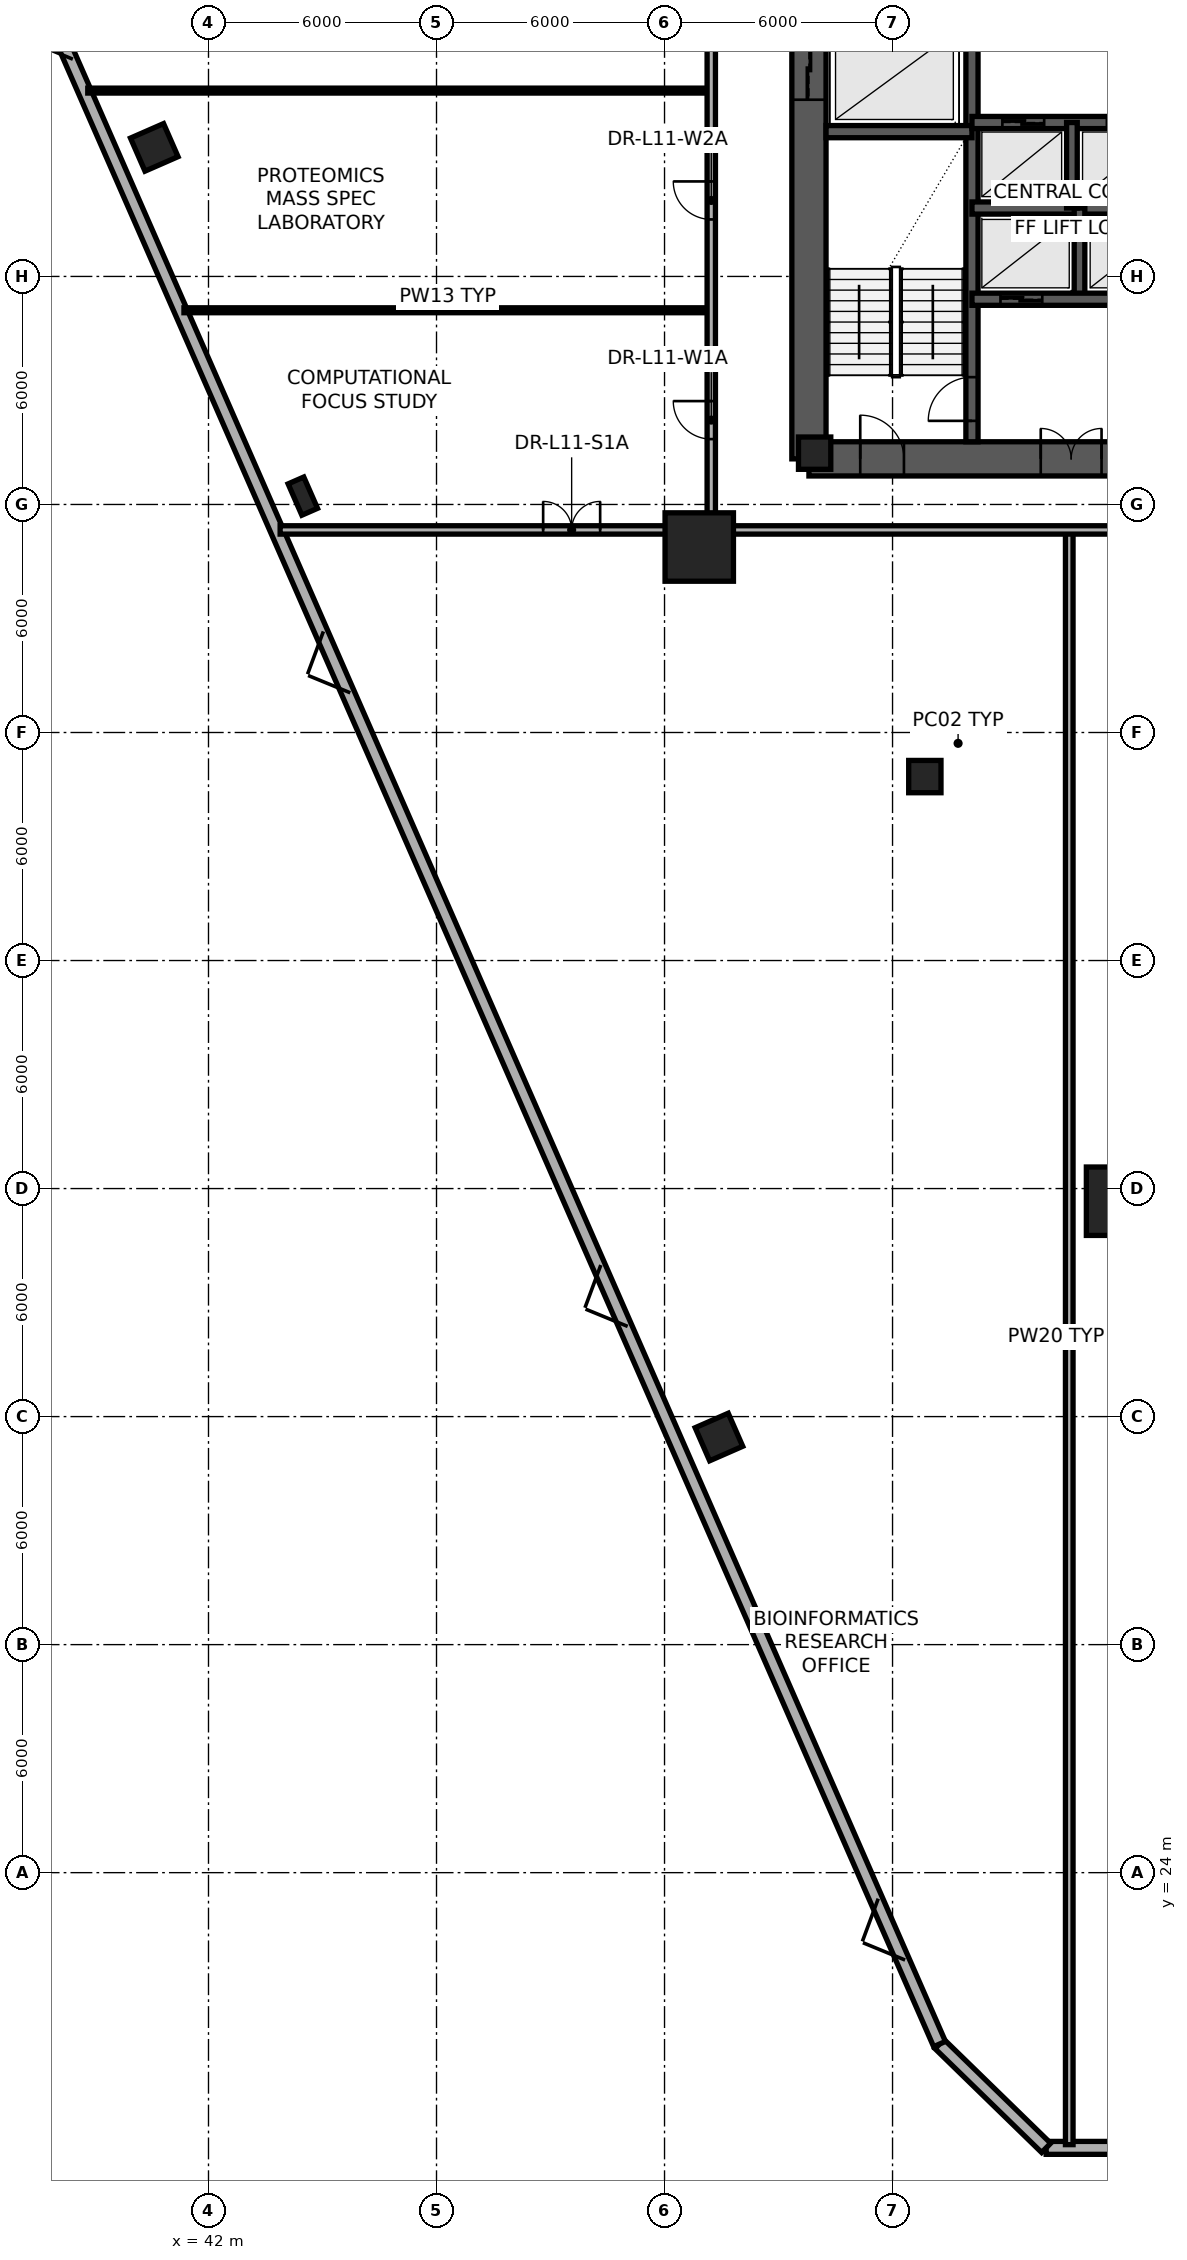
"""IFC4 building model, lengths in metres.
Left out: names, types, materials, properties, quantities, classifications, styles, units other than length and angle.
Written with IfcOpenShell. Run it as: python <this file> out.ifc"""

import sys

from ifc_helpers import new_model, si_unit, direction, frame, frame_2d, origin, origin_2d, place, context, subcontext, project, spatial, rectangle, extrude, element, fill, save


model = new_model("IFC4")
c1 = context("Model", 3, precision=1e-05, world=origin(), true_north=direction((0.0, 1.0)))
c2 = subcontext(c1, "Body", "Model", "MODEL_VIEW")
j1 = project(units=[si_unit("LENGTHUNIT", "METRE"), si_unit("PLANEANGLEUNIT", "RADIAN")], contexts=[c1])
p1 = place(None, origin())
s1 = spatial("IfcSite", under=j1, at=p1, CompositionType="ELEMENT")
p2 = place(p1, origin())
s2 = spatial("IfcBuilding", under=s1, at=p2, CompositionType="ELEMENT")
p3 = place(p2, frame((0.0, 0.0, 44.7)))
s3 = spatial("IfcBuildingStorey", under=s2, at=p3, CompositionType="ELEMENT", Elevation=44.7)
p4 = place(p3, frame((57.8, 61.2, 0.0), z_axis=(0.0, 0.0, 1.0), x_axis=(1.0, 0.0, 0.0)))
e1 = element("IfcWall", 1, at=p4, inside=s3, PredefinedType="SHEAR", context=c2, shape_type="SweptSolid", body=[
    extrude(rectangle(XDim=16.4, YDim=0.9, at=frame_2d((8.2, 0.0))), origin(), (0.0, 0.0, 1.0), 3.65),
])
p5 = place(p4, frame((1.35, 0.0, 0.0)))
e2 = element("IfcOpeningElement", 2, at=p5, cuts=e1, PredefinedType="OPENING", context=c2, shape_type="SweptSolid", body=[
    extrude(rectangle(XDim=1.15, YDim=2.15, at=frame_2d((0.575, 1.075))), frame((0.0, 0.46, 0.0), z_axis=(0.0, -1.0, 0.0), x_axis=(1.0, 0.0, 0.0)), (0.0, 0.0, 1.0), 0.92),
])
p6 = place(p4, frame((6.1, 0.0, 0.0)))
e3 = element("IfcOpeningElement", 3, at=p6, cuts=e1, PredefinedType="OPENING", context=c2, shape_type="SweptSolid", body=[
    extrude(rectangle(XDim=1.6, YDim=2.15, at=frame_2d((0.8, 1.075))), frame((0.0, 0.46, 0.0), z_axis=(0.0, -1.0, 0.0), x_axis=(1.0, 0.0, 0.0)), (0.0, 0.0, 1.0), 0.92),
])
p7 = place(p4, frame((13.55, 0.0, 0.0)))
e4 = element("IfcOpeningElement", 4, at=p7, cuts=e1, PredefinedType="OPENING", context=c2, shape_type="SweptSolid", body=[
    extrude(rectangle(XDim=1.15, YDim=2.15, at=frame_2d((0.575, 1.075))), frame((0.0, 0.46, 0.0), z_axis=(0.0, -1.0, 0.0), x_axis=(1.0, 0.0, 0.0)), (0.0, 0.0, 1.0), 0.92),
])
p8 = place(p3, frame((57.8, 74.8, 0.0), z_axis=(0.0, 0.0, 1.0), x_axis=(0.0, -1.0, 0.0)))
e5 = element("IfcWall", 5, at=p8, inside=s3, PredefinedType="SHEAR", context=c2, shape_type="SweptSolid", body=[
    extrude(rectangle(XDim=13.6, YDim=0.9, at=frame_2d((6.8, 0.0))), origin(), (0.0, 0.0, 1.0), 3.65),
])
p9 = place(p8, frame((0.85, 0.0, 0.0)))
e6 = element("IfcOpeningElement", 6, at=p9, cuts=e5, PredefinedType="OPENING", context=c2, shape_type="SweptSolid", body=[
    extrude(rectangle(XDim=0.92, YDim=2.05, at=frame_2d((0.46, 1.025))), frame((0.0, 0.46, 0.0), z_axis=(0.0, -1.0, 0.0), x_axis=(1.0, 0.0, 0.0)), (0.0, 0.0, 1.0), 0.92),
])
p10 = place(p8, frame((2.55, 0.0, 0.0)))
e7 = element("IfcOpeningElement", 7, at=p10, cuts=e5, PredefinedType="OPENING", context=c2, shape_type="SweptSolid", body=[
    extrude(rectangle(XDim=1.6, YDim=2.3, at=frame_2d((0.8, 1.15))), frame((0.0, 0.46, 0.0), z_axis=(0.0, -1.0, 0.0), x_axis=(1.0, 0.0, 0.0)), (0.0, 0.0, 1.0), 0.92),
])
p11 = place(p3, frame((62.09, 61.65, 0.0), z_axis=(0.0, 0.0, 1.0), x_axis=(0.0, 1.0, 0.0)))
e8 = element("IfcWall", 8, at=p11, inside=s3, PredefinedType="SHEAR", context=c2, shape_type="SweptSolid", body=[
    extrude(rectangle(XDim=12.7, YDim=0.32, at=frame_2d((6.35, 0.0))), origin(), (0.0, 0.0, 1.0), 3.65),
])
p12 = place(p11, frame((0.55, 0.0, 0.0)))
e9 = element("IfcOpeningElement", 9, at=p12, cuts=e8, PredefinedType="OPENING", context=c2, shape_type="SweptSolid", body=[
    extrude(rectangle(XDim=1.15, YDim=2.15, at=frame_2d((0.575, 1.075))), frame((0.0, 0.17, 0.0), z_axis=(0.0, -1.0, 0.0), x_axis=(1.0, 0.0, 0.0)), (0.0, 0.0, 1.0), 0.34),
])
p13 = place(p3, frame((58.25, 69.81, 0.0), z_axis=(0.0, 0.0, 1.0), x_axis=(1.0, 0.0, 0.0)))
e10 = element("IfcWall", 10, at=p13, inside=s3, PredefinedType="SHEAR", context=c2, shape_type="SweptSolid", body=[
    extrude(rectangle(XDim=3.84, YDim=0.32, at=frame_2d((1.92, 0.0))), origin(), (0.0, 0.0, 1.0), 3.65),
])
p14 = place(p3, frame((62.09, 67.8, 0.0), z_axis=(0.0, 0.0, 1.0), x_axis=(1.0, 0.0, 0.0)))
e11 = element("IfcWall", 11, at=p14, inside=s3, PredefinedType="SHEAR", context=c2, shape_type="SweptSolid", body=[
    extrude(rectangle(XDim=7.82, YDim=0.32, at=frame_2d((3.91, 0.0))), origin(), (0.0, 0.0, 1.0), 3.65),
])
p15 = place(p3, frame((64.92, 65.4, 0.0), z_axis=(0.0, 0.0, 1.0), x_axis=(0.0, 1.0, 0.0)))
e12 = element("IfcWall", 12, at=p15, inside=s3, PredefinedType="SHEAR", context=c2, shape_type="SweptSolid", body=[
    extrude(rectangle(XDim=2.4, YDim=0.28, at=frame_2d((1.2, 0.0))), origin(), (0.0, 0.0, 1.0), 3.65),
])
p16 = place(p3, frame((62.09, 70.05, 0.0), z_axis=(0.0, 0.0, 1.0), x_axis=(1.0, 0.0, 0.0)))
e13 = element("IfcWall", 13, at=p16, inside=s3, PredefinedType="SHEAR", context=c2, shape_type="SweptSolid", body=[
    extrude(rectangle(XDim=7.82, YDim=0.32, at=frame_2d((3.91, 0.0))), origin(), (0.0, 0.0, 1.0), 3.65),
])
p17 = place(p16, frame((0.8, 0.0, 0.0)))
e14 = element("IfcOpeningElement", 14, at=p17, cuts=e13, PredefinedType="OPENING", context=c2, shape_type="SweptSolid", body=[
    extrude(rectangle(XDim=1.1, YDim=2.2, at=frame_2d((0.55, 1.1))), frame((0.0, 0.17, 0.0), z_axis=(0.0, -1.0, 0.0), x_axis=(1.0, 0.0, 0.0)), (0.0, 0.0, 1.0), 0.34),
])
p18 = place(p16, frame((3.55, 0.0, 0.0)))
e15 = element("IfcOpeningElement", 15, at=p18, cuts=e13, PredefinedType="OPENING", context=c2, shape_type="SweptSolid", body=[
    extrude(rectangle(XDim=1.1, YDim=2.2, at=frame_2d((0.55, 1.1))), frame((0.0, 0.17, 0.0), z_axis=(0.0, -1.0, 0.0), x_axis=(1.0, 0.0, 0.0)), (0.0, 0.0, 1.0), 0.34),
])
p19 = place(p3, frame((62.09, 65.4, 0.0), z_axis=(0.0, 0.0, 1.0), x_axis=(1.0, 0.0, 0.0)))
e16 = element("IfcWall", 16, at=p19, inside=s3, PredefinedType="SHEAR", context=c2, shape_type="SweptSolid", body=[
    extrude(rectangle(XDim=5.79, YDim=0.32, at=frame_2d((2.895, 0.0))), origin(), (0.0, 0.0, 1.0), 3.65),
])
p20 = place(p19, frame((0.75, 0.0, 0.0)))
e17 = element("IfcOpeningElement", 17, at=p20, cuts=e16, PredefinedType="OPENING", context=c2, shape_type="SweptSolid", body=[
    extrude(rectangle(XDim=1.1, YDim=2.2, at=frame_2d((0.55, 1.1))), frame((0.0, 0.17, 0.0), z_axis=(0.0, -1.0, 0.0), x_axis=(1.0, 0.0, 0.0)), (0.0, 0.0, 1.0), 0.34),
])
p21 = place(p19, frame((3.6, 0.0, 0.0)))
e18 = element("IfcOpeningElement", 18, at=p21, cuts=e16, PredefinedType="OPENING", context=c2, shape_type="SweptSolid", body=[
    extrude(rectangle(XDim=1.1, YDim=2.2, at=frame_2d((0.55, 1.1))), frame((0.0, 0.17, 0.0), z_axis=(0.0, -1.0, 0.0), x_axis=(1.0, 0.0, 0.0)), (0.0, 0.0, 1.0), 0.34),
])
p22 = place(p3, frame((64.72, 67.8, 0.0), z_axis=(0.0, 0.0, 1.0), x_axis=(0.0, 1.0, 0.0)))
e19 = element("IfcWall", 19, at=p22, inside=s3, PredefinedType="SHEAR", context=c2, shape_type="SweptSolid", body=[
    extrude(rectangle(XDim=2.25, YDim=0.28, at=frame_2d((1.125, 0.0))), origin(), (0.0, 0.0, 1.0), 3.65),
])
for number, where, z_axis, x_axis in (
    (20, (57.95, 61.35, 0.0), (0.0, 0.0, 1.0), (1.0, 0.0, 0.0)),
    (21, (60.85, 52.84, 0.0), (0.0, 0.0, 1.0), (1.0, 0.0, 0.0)),
):
    element("IfcColumn", number, at=place(p3, frame(where, z_axis=z_axis, x_axis=x_axis)), inside=s3, PredefinedType="COLUMN", context=c2, shape_type="SweptSolid", body=[
        extrude(rectangle(XDim=0.85, YDim=0.85, at=origin_2d()), origin(), (0.0, 0.0, 1.0), 3.65),
    ])
for number, where, z_axis, x_axis in (
    (22, (66.0, 41.667, 0.0), (0.0, 0.0, 1.0), (1.0, 0.0, 0.0)),
    (23, (54.914, 58.88, 0.0), (0.0, 0.0, 1.0), (1.0, 0.0, 0.0)),
):
    element("IfcColumn", number, at=place(p3, frame(where, z_axis=z_axis, x_axis=x_axis)), inside=s3, PredefinedType="COLUMN", context=c2, shape_type="SweptSolid", body=[
        extrude(rectangle(XDim=1.8, YDim=1.8, at=origin_2d()), origin(), (0.0, 0.0, 1.0), 3.65),
    ])
p23 = place(p3, frame((40.501, 69.406, 0.003), z_axis=(0.039229493406, -0.00569028488, 0.999214024874), x_axis=(0.963398005451, 0.26560461156, -0.036310789174)))
e24 = element("IfcColumn", 24, at=p23, inside=s3, PredefinedType="COLUMN", context=c2, shape_type="SweptSolid", body=[
    extrude(rectangle(XDim=0.95, YDim=0.95, at=origin_2d()), origin(), (0.0, 0.0, 1.0), 3.647),
])
p24 = place(p3, frame((44.424, 60.201, 0.003), z_axis=(0.032006476949, 0.010512587617, 0.999432374368), x_axis=(0.744599581882, 0.666797695384, -0.030859295077)))
e25 = element("IfcColumn", 25, at=p24, inside=s3, PredefinedType="PILASTER", context=c2, shape_type="SweptSolid", body=[
    extrude(rectangle(XDim=0.9, YDim=0.45, at=origin_2d()), origin(), (0.0, 0.0, 1.0), 3.646),
])
p25 = place(p3, frame((55.409, 35.363, 0.003), z_axis=(0.012375141264, 0.054450621561, 0.998439775695), x_axis=(-0.188482061822, 0.98074372261, -0.051149417712)))
e26 = element("IfcColumn", 26, at=p25, inside=s3, PredefinedType="COLUMN", context=c2, shape_type="SweptSolid", body=[
    extrude(rectangle(XDim=0.95, YDim=0.95, at=origin_2d()), origin(), (0.0, 0.0, 1.0), 3.65),
])
p26 = place(p3, frame((67.958, 16.758, 0.0), z_axis=(0.0, 0.0, 1.0), x_axis=(-1.0, 0.0, 0.0)))
e27 = element("IfcWall", 27, at=p26, inside=s3, PredefinedType="STANDARD", context=c2, shape_type="SweptSolid", body=[
    extrude(rectangle(XDim=3.916, YDim=0.34, at=frame_2d((1.958, 0.0))), origin(), (0.0, 0.0, 1.0), 3.375),
])
p27 = place(p3, frame((64.042, 16.758, 0.0), z_axis=(0.0, 0.0, 1.0), x_axis=(-0.716458886532, 0.697629316979, 0.0)))
e28 = element("IfcWall", 28, at=p27, inside=s3, PredefinedType="STANDARD", context=c2, shape_type="SweptSolid", body=[
    extrude(rectangle(XDim=3.916, YDim=0.34, at=frame_2d((1.958, 0.0))), origin(), (0.0, 0.0, 1.0), 3.375),
])
p28 = place(p3, frame((61.237, 19.49, 0.0), z_axis=(0.0, 0.0, 1.0), x_axis=(-0.401097303432, 0.916035454106, 0.0)))
e29 = element("IfcWall", 29, at=p28, inside=s3, PredefinedType="STANDARD", context=c2, shape_type="SweptSolid", body=[
    extrude(rectangle(XDim=71.007, YDim=0.34, at=frame_2d((35.503, 0.0))), origin(), (0.0, 0.0, 1.0), 0.85),
])
p29 = place(p3, frame((64.65, 16.844, 0.0), z_axis=(0.0, 0.0, 1.0), x_axis=(0.0, 1.0, 0.0)))
e30 = element("IfcWall", 30, at=p29, inside=s3, PredefinedType="PARTITIONING", context=c2, shape_type="SweptSolid", body=[
    extrude(rectangle(XDim=42.487, YDim=0.2, at=frame_2d((21.243, 0.0))), origin(), (0.0, 0.0, 1.0), 2.505),
])
p30 = place(p3, frame((43.885, 59.33, 0.0), z_axis=(0.0, 0.0, 1.0), x_axis=(1.0, 0.0, 0.0)))
e31 = element("IfcWall", 31, at=p30, inside=s3, PredefinedType="PARTITIONING", context=c2, shape_type="SweptSolid", body=[
    extrude(rectangle(XDim=32.915, YDim=0.22, at=frame_2d((16.458, 0.0))), origin(), (0.0, 0.0, 1.0), 2.505),
])
p31 = place(p30, frame((6.921, 0.0, 0.0)))
e32 = element("IfcOpeningElement", 32, at=p31, cuts=e31, PredefinedType="OPENING", context=c2, shape_type="SweptSolid", body=[
    extrude(rectangle(XDim=1.5, YDim=2.2, at=frame_2d((0.75, 1.1))), frame((0.0, 0.12, 0.0), z_axis=(0.0, -1.0, 0.0), x_axis=(1.0, 0.0, 0.0)), (0.0, 0.0, 1.0), 0.24),
])
p32 = place(p30, frame((26.015, 0.0, 0.0)))
e33 = element("IfcOpeningElement", 33, at=p32, cuts=e31, PredefinedType="OPENING", context=c2, shape_type="SweptSolid", body=[
    extrude(rectangle(XDim=1.5, YDim=2.2, at=frame_2d((0.75, 1.1))), frame((0.0, 0.12, 0.0), z_axis=(0.0, -1.0, 0.0), x_axis=(1.0, 0.0, 0.0)), (0.0, 0.0, 1.0), 0.24),
])
p33 = place(p3, frame((41.354, 65.11, 0.0), z_axis=(0.0, 0.0, 1.0), x_axis=(1.0, 0.0, 0.0)))
e34 = element("IfcWall", 34, at=p33, inside=s3, PredefinedType="PARTITIONING", context=c2, shape_type="SweptSolid", body=[
    extrude(rectangle(XDim=13.876, YDim=0.13, at=frame_2d((6.938, 0.0))), origin(), (0.0, 0.0, 1.0), 2.505),
])
p34 = place(p3, frame((38.823, 70.89, 0.0), z_axis=(0.0, 0.0, 1.0), x_axis=(1.0, 0.0, 0.0)))
e35 = element("IfcWall", 35, at=p34, inside=s3, PredefinedType="PARTITIONING", context=c2, shape_type="SweptSolid", body=[
    extrude(rectangle(XDim=16.407, YDim=0.13, at=frame_2d((8.203, 0.0))), origin(), (0.0, 0.0, 1.0), 2.505),
])
p35 = place(p3, frame((55.23, 59.33, 0.0), z_axis=(0.0, 0.0, 1.0), x_axis=(0.0, 1.0, 0.0)))
e36 = element("IfcWall", 36, at=p35, inside=s3, PredefinedType="PARTITIONING", context=c2, shape_type="SweptSolid", body=[
    extrude(rectangle(XDim=32.406, YDim=0.22, at=frame_2d((16.203, 0.0))), origin(), (0.0, 0.0, 1.0), 2.505),
])
p36 = place(p35, frame((2.39, 0.0, 0.0)))
e37 = element("IfcOpeningElement", 37, at=p36, cuts=e36, PredefinedType="OPENING", context=c2, shape_type="SweptSolid", body=[
    extrude(rectangle(XDim=1.0, YDim=2.1, at=frame_2d((0.5, 1.05))), frame((0.0, 0.12, 0.0), z_axis=(0.0, -1.0, 0.0), x_axis=(1.0, 0.0, 0.0)), (0.0, 0.0, 1.0), 0.24),
])
p37 = place(p35, frame((8.17, 0.0, 0.0)))
e38 = element("IfcOpeningElement", 38, at=p37, cuts=e36, PredefinedType="OPENING", context=c2, shape_type="SweptSolid", body=[
    extrude(rectangle(XDim=1.0, YDim=2.1, at=frame_2d((0.5, 1.05))), frame((0.0, 0.12, 0.0), z_axis=(0.0, -1.0, 0.0), x_axis=(1.0, 0.0, 0.0)), (0.0, 0.0, 1.0), 0.24),
])
p38 = place(p35, frame((13.95, 0.0, 0.0)))
e39 = element("IfcOpeningElement", 39, at=p38, cuts=e36, PredefinedType="OPENING", context=c2, shape_type="SweptSolid", body=[
    extrude(rectangle(XDim=1.0, YDim=2.1, at=frame_2d((0.5, 1.05))), frame((0.0, 0.12, 0.0), z_axis=(0.0, -1.0, 0.0), x_axis=(1.0, 0.0, 0.0)), (0.0, 0.0, 1.0), 0.24),
])
p39 = place(p12, origin())
e40 = element("IfcDoor", 40, at=p39, inside=s3, OperationType="SINGLE_SWING_LEFT", PredefinedType="DOOR", context=c2, shape_type="SweptSolid", body=[
    extrude(rectangle(XDim=1.15, YDim=2.15, at=frame_2d((0.575, 1.075))), frame((0.0, 0.025, 0.0), z_axis=(0.0, -1.0, 0.0), x_axis=(1.0, 0.0, 0.0)), (0.0, 0.0, 1.0), 0.05),
])
fill(e9, e40)
p40 = place(p20, origin())
e41 = element("IfcDoor", 41, at=p40, inside=s3, OperationType="SLIDING_TO_LEFT", PredefinedType="DOOR", context=c2, shape_type="SweptSolid", body=[
    extrude(rectangle(XDim=1.1, YDim=2.2, at=frame_2d((0.55, 1.1))), frame((0.0, 0.025, 0.0), z_axis=(0.0, -1.0, 0.0), x_axis=(1.0, 0.0, 0.0)), (0.0, 0.0, 1.0), 0.05),
])
fill(e17, e41)
p41 = place(p17, origin())
e42 = element("IfcDoor", 42, at=p41, inside=s3, OperationType="SLIDING_TO_LEFT", PredefinedType="DOOR", context=c2, shape_type="SweptSolid", body=[
    extrude(rectangle(XDim=1.1, YDim=2.2, at=frame_2d((0.55, 1.1))), frame((0.0, 0.025, 0.0), z_axis=(0.0, -1.0, 0.0), x_axis=(1.0, 0.0, 0.0)), (0.0, 0.0, 1.0), 0.05),
])
fill(e14, e42)
p42 = place(p18, origin())
e43 = element("IfcDoor", 43, at=p42, inside=s3, OperationType="SLIDING_TO_LEFT", PredefinedType="DOOR", context=c2, shape_type="SweptSolid", body=[
    extrude(rectangle(XDim=1.1, YDim=2.2, at=frame_2d((0.55, 1.1))), frame((0.0, 0.025, 0.0), z_axis=(0.0, -1.0, 0.0), x_axis=(1.0, 0.0, 0.0)), (0.0, 0.0, 1.0), 0.05),
])
fill(e15, e43)
p43 = place(p5, origin())
e44 = element("IfcDoor", 44, at=p43, inside=s3, OperationType="SINGLE_SWING_LEFT", PredefinedType="DOOR", context=c2, shape_type="SweptSolid", body=[
    extrude(rectangle(XDim=1.15, YDim=2.15, at=frame_2d((0.575, 1.075))), frame((0.0, 0.025, 0.0), z_axis=(0.0, -1.0, 0.0), x_axis=(1.0, 0.0, 0.0)), (0.0, 0.0, 1.0), 0.05),
])
fill(e2, e44)
p44 = place(p6, origin())
e45 = element("IfcDoor", 45, at=p44, inside=s3, OperationType="DOUBLE_DOOR_SINGLE_SWING", PredefinedType="DOOR", context=c2, shape_type="SweptSolid", body=[
    extrude(rectangle(XDim=1.6, YDim=2.15, at=frame_2d((0.8, 1.075))), frame((0.0, 0.025, 0.0), z_axis=(0.0, -1.0, 0.0), x_axis=(1.0, 0.0, 0.0)), (0.0, 0.0, 1.0), 0.05),
])
fill(e3, e45)
p45 = place(p10, origin())
e46 = element("IfcDoor", 46, at=p45, inside=s3, OperationType="DOUBLE_DOOR_SLIDING", PredefinedType="DOOR", context=c2, shape_type="SweptSolid", body=[
    extrude(rectangle(XDim=1.6, YDim=2.3, at=frame_2d((0.8, 1.15))), frame((0.0, 0.025, 0.0), z_axis=(0.0, -1.0, 0.0), x_axis=(1.0, 0.0, 0.0)), (0.0, 0.0, 1.0), 0.05),
])
fill(e7, e46)
p46 = place(p31, origin())
e47 = element("IfcDoor", 47, at=p46, inside=s3, OperationType="DOUBLE_DOOR_SINGLE_SWING", PredefinedType="DOOR", context=c2, shape_type="SweptSolid", body=[
    extrude(rectangle(XDim=1.5, YDim=2.2, at=frame_2d((0.75, 1.1))), frame((0.0, 0.025, 0.0), z_axis=(0.0, -1.0, 0.0), x_axis=(1.0, 0.0, 0.0)), (0.0, 0.0, 1.0), 0.05),
])
fill(e32, e47)
p47 = place(p36, origin())
e48 = element("IfcDoor", 48, at=p47, inside=s3, OperationType="SINGLE_SWING_RIGHT", PredefinedType="DOOR", context=c2, shape_type="SweptSolid", body=[
    extrude(rectangle(XDim=1.0, YDim=2.1, at=frame_2d((0.5, 1.05))), frame((0.0, 0.025, 0.0), z_axis=(0.0, -1.0, 0.0), x_axis=(1.0, 0.0, 0.0)), (0.0, 0.0, 1.0), 0.05),
])
fill(e37, e48)
p48 = place(p37, origin())
e49 = element("IfcDoor", 49, at=p48, inside=s3, OperationType="SINGLE_SWING_RIGHT", PredefinedType="DOOR", context=c2, shape_type="SweptSolid", body=[
    extrude(rectangle(XDim=1.0, YDim=2.1, at=frame_2d((0.5, 1.05))), frame((0.0, 0.025, 0.0), z_axis=(0.0, -1.0, 0.0), x_axis=(1.0, 0.0, 0.0)), (0.0, 0.0, 1.0), 0.05),
])
fill(e38, e49)
save(model, sys.argv[1])
